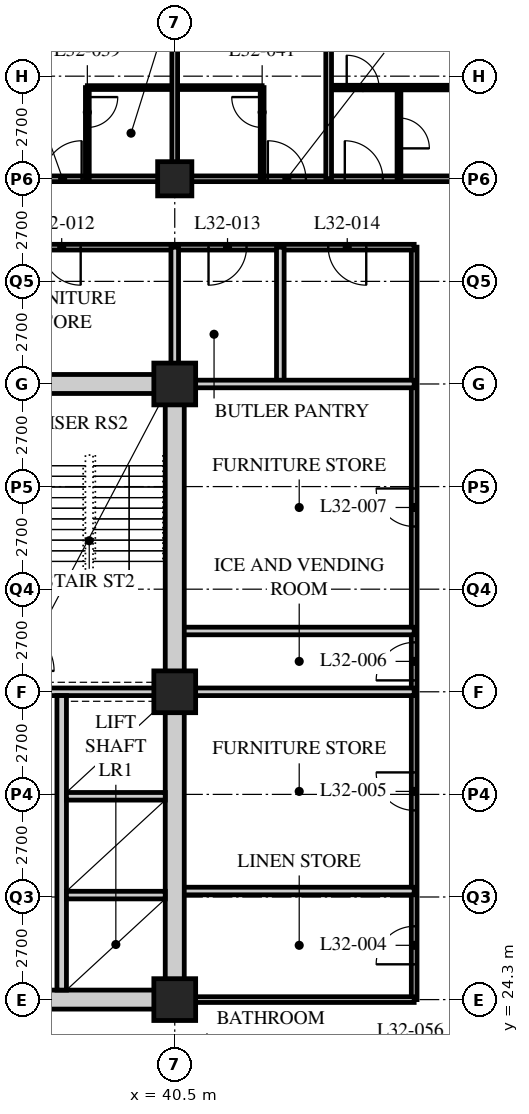
"""IFC4 building model, lengths in metres.
Left out: names, types, materials, properties, quantities, classifications, styles, units other than length and angle.
Written with IfcOpenShell. Run it as: python <this file> out.ifc"""

import sys

from ifc_helpers import new_model, si_unit, direction, frame, frame_2d, origin, origin_2d, place, context, subcontext, project, spatial, rectangle, hollow_rectangle, extrude, element, fill, save


model = new_model("IFC4")
c1 = context("Model", 3, precision=1e-05, world=origin(), true_north=direction((0.0, 1.0)))
c2 = subcontext(c1, "Body", "Model", "MODEL_VIEW")
j1 = project(units=[si_unit("LENGTHUNIT", "METRE"), si_unit("PLANEANGLEUNIT", "RADIAN")], contexts=[c1])
p1 = place(None, origin())
s1 = spatial("IfcSite", under=j1, at=p1, CompositionType="ELEMENT")
p2 = place(p1, origin())
s2 = spatial("IfcBuilding", under=s1, at=p2, CompositionType="ELEMENT")
p3 = place(p2, frame((0.0, 0.0, 127.2)))
s3 = spatial("IfcBuildingStorey", under=s2, at=p3, CompositionType="ELEMENT", Elevation=127.2)
for number, where, z_axis, x_axis in (
    (1, (40.5, 24.3, 0.0), (0.0, 0.0, 1.0), (1.0, 0.0, 0.0)),
    (2, (40.5, 32.4, 0.0), (0.0, 0.0, 1.0), (1.0, 0.0, 0.0)),
    (3, (40.5, 40.5, 0.0), (0.0, 0.0, 1.0), (1.0, 0.0, 0.0)),
):
    element("IfcColumn", number, at=place(p3, frame(where, z_axis=z_axis, x_axis=x_axis)), inside=s3, PredefinedType="COLUMN", context=c2, shape_type="SweptSolid", body=[
        extrude(hollow_rectangle(XDim=1.1, YDim=1.1, WallThickness=0.1, at=origin_2d()), origin(), (0.0, 0.0, 1.0), 3.4),
    ])
p4 = place(p3, frame((40.5, 45.9, 0.0), z_axis=(0.0, 0.0, 1.0), x_axis=(1.0, 0.0, 0.0)))
e4 = element("IfcColumn", 4, at=p4, inside=s3, PredefinedType="COLUMN", context=c2, shape_type="SweptSolid", body=[
    extrude(hollow_rectangle(XDim=0.9, YDim=0.9, WallThickness=0.09, at=origin_2d()), origin(), (0.0, 0.0, 1.0), 3.4),
])
p5 = place(p3, frame((8.1, 45.9, 0.0), z_axis=(0.0, 0.0, 1.0), x_axis=(1.0, 0.0, 0.0)))
e5 = element("IfcWall", 5, at=p5, inside=s3, PredefinedType="PARTITIONING", context=c2, shape_type="SweptSolid", body=[
    extrude(rectangle(XDim=40.5, YDim=0.15, at=frame_2d((20.25, 0.0))), origin(), (0.0, 0.0, 1.0), 2.578),
])
p6 = place(p5, frame((9.625, 0.0, 0.0)))
e6 = element("IfcOpeningElement", 6, at=p6, cuts=e5, PredefinedType="OPENING", context=c2, shape_type="SweptSolid", body=[
    extrude(rectangle(XDim=1.0, YDim=2.1, at=frame_2d((0.5, 1.05))), frame((0.0, 0.085, 0.0), z_axis=(0.0, -1.0, 0.0), x_axis=(1.0, 0.0, 0.0)), (0.0, 0.0, 1.0), 0.17),
])
p7 = place(p5, frame((21.65, 0.0, 0.0)))
e7 = element("IfcOpeningElement", 7, at=p7, cuts=e5, PredefinedType="OPENING", context=c2, shape_type="SweptSolid", body=[
    extrude(rectangle(XDim=1.0, YDim=2.1, at=frame_2d((0.5, 1.05))), frame((0.0, 0.085, 0.0), z_axis=(0.0, -1.0, 0.0), x_axis=(1.0, 0.0, 0.0)), (0.0, 0.0, 1.0), 0.17),
])
p8 = place(p5, frame((26.75, 0.0, 0.0)))
e8 = element("IfcOpeningElement", 8, at=p8, cuts=e5, PredefinedType="OPENING", context=c2, shape_type="SweptSolid", body=[
    extrude(rectangle(XDim=1.0, YDim=2.1, at=frame_2d((0.5, 1.05))), frame((0.0, 0.085, 0.0), z_axis=(0.0, -1.0, 0.0), x_axis=(1.0, 0.0, 0.0)), (0.0, 0.0, 1.0), 0.17),
])
p9 = place(p5, frame((28.95, 0.0, 0.0)))
e9 = element("IfcOpeningElement", 9, at=p9, cuts=e5, PredefinedType="OPENING", context=c2, shape_type="SweptSolid", body=[
    extrude(rectangle(XDim=1.0, YDim=2.1, at=frame_2d((0.5, 1.05))), frame((0.0, 0.085, 0.0), z_axis=(0.0, -1.0, 0.0), x_axis=(1.0, 0.0, 0.0)), (0.0, 0.0, 1.0), 0.17),
])
p10 = place(p5, frame((34.85, 0.0, 0.0)))
e10 = element("IfcOpeningElement", 10, at=p10, cuts=e5, PredefinedType="OPENING", context=c2, shape_type="SweptSolid", body=[
    extrude(rectangle(XDim=1.0, YDim=2.1, at=frame_2d((0.5, 1.05))), frame((0.0, 0.085, 0.0), z_axis=(0.0, -1.0, 0.0), x_axis=(1.0, 0.0, 0.0)), (0.0, 0.0, 1.0), 0.17),
])
p11 = place(p5, frame((36.875, 0.0, 0.0)))
e11 = element("IfcOpeningElement", 11, at=p11, cuts=e5, PredefinedType="OPENING", context=c2, shape_type="SweptSolid", body=[
    extrude(rectangle(XDim=1.0, YDim=2.1, at=frame_2d((0.5, 1.05))), frame((0.0, 0.085, 0.0), z_axis=(0.0, -1.0, 0.0), x_axis=(1.0, 0.0, 0.0)), (0.0, 0.0, 1.0), 0.17),
])
p12 = place(p5, frame((2.625, 0.0, 0.0)))
e12 = element("IfcOpeningElement", 12, at=p12, cuts=e5, PredefinedType="OPENING", context=c2, shape_type="SweptSolid", body=[
    extrude(rectangle(XDim=1.0, YDim=2.1, at=frame_2d((0.5, 1.05))), frame((0.0, 0.085, 0.0), z_axis=(0.0, -1.0, 0.0), x_axis=(1.0, 0.0, 0.0)), (0.0, 0.0, 1.0), 0.17),
])
p13 = place(p3, frame((46.8, 24.3, 0.0), z_axis=(0.0, 0.0, 1.0), x_axis=(0.0, 1.0, 0.0)))
e13 = element("IfcWall", 13, at=p13, inside=s3, PredefinedType="PARTITIONING", context=c2, shape_type="SweptSolid", body=[
    extrude(rectangle(XDim=19.8, YDim=0.15, at=frame_2d((9.9, 0.0))), origin(), (0.0, 0.0, 1.0), 3.19),
])
p14 = place(p13, frame((0.929, 0.0, 0.0)))
e14 = element("IfcOpeningElement", 14, at=p14, cuts=e13, PredefinedType="OPENING", context=c2, shape_type="SweptSolid", body=[
    extrude(rectangle(XDim=1.0, YDim=2.1, at=frame_2d((0.5, 1.05))), frame((0.0, 0.085, 0.0), z_axis=(0.0, -1.0, 0.0), x_axis=(1.0, 0.0, 0.0)), (0.0, 0.0, 1.0), 0.17),
])
p15 = place(p13, frame((4.979, 0.0, 0.0)))
e15 = element("IfcOpeningElement", 15, at=p15, cuts=e13, PredefinedType="OPENING", context=c2, shape_type="SweptSolid", body=[
    extrude(rectangle(XDim=1.0, YDim=2.1, at=frame_2d((0.5, 1.05))), frame((0.0, 0.085, 0.0), z_axis=(0.0, -1.0, 0.0), x_axis=(1.0, 0.0, 0.0)), (0.0, 0.0, 1.0), 0.17),
])
p16 = place(p13, frame((8.4, 0.0, 0.0)))
e16 = element("IfcOpeningElement", 16, at=p16, cuts=e13, PredefinedType="OPENING", context=c2, shape_type="SweptSolid", body=[
    extrude(rectangle(XDim=1.0, YDim=2.1, at=frame_2d((0.5, 1.05))), frame((0.0, 0.085, 0.0), z_axis=(0.0, -1.0, 0.0), x_axis=(1.0, 0.0, 0.0)), (0.0, 0.0, 1.0), 0.17),
])
p17 = place(p13, frame((12.45, 0.0, 0.0)))
e17 = element("IfcOpeningElement", 17, at=p17, cuts=e13, PredefinedType="OPENING", context=c2, shape_type="SweptSolid", body=[
    extrude(rectangle(XDim=1.0, YDim=2.1, at=frame_2d((0.5, 1.05))), frame((0.0, 0.085, 0.0), z_axis=(0.0, -1.0, 0.0), x_axis=(1.0, 0.0, 0.0)), (0.0, 0.0, 1.0), 0.17),
])
p18 = place(p3, frame((46.8, 44.1, 0.0), z_axis=(0.0, 0.0, 1.0), x_axis=(-1.0, 0.0, 0.0)))
e18 = element("IfcWall", 18, at=p18, inside=s3, PredefinedType="PARTITIONING", context=c2, shape_type="SweptSolid", body=[
    extrude(rectangle(XDim=17.24, YDim=0.15, at=frame_2d((8.62, 0.0))), origin(), (0.0, 0.0, 1.0), 3.19),
])
p19 = place(p18, frame((14.25, 0.0, 0.0)))
e19 = element("IfcOpeningElement", 19, at=p19, cuts=e18, PredefinedType="OPENING", context=c2, shape_type="SweptSolid", body=[
    extrude(rectangle(XDim=1.0, YDim=2.1, at=frame_2d((0.5, 1.05))), frame((0.0, 0.085, 0.0), z_axis=(0.0, -1.0, 0.0), x_axis=(1.0, 0.0, 0.0)), (0.0, 0.0, 1.0), 0.17),
])
p20 = place(p18, frame((8.775, 0.0, 0.0)))
e20 = element("IfcOpeningElement", 20, at=p20, cuts=e18, PredefinedType="OPENING", context=c2, shape_type="SweptSolid", body=[
    extrude(rectangle(XDim=1.0, YDim=2.1, at=frame_2d((0.5, 1.05))), frame((0.0, 0.085, 0.0), z_axis=(0.0, -1.0, 0.0), x_axis=(1.0, 0.0, 0.0)), (0.0, 0.0, 1.0), 0.17),
])
p21 = place(p18, frame((4.411, 0.0, 0.0)))
e21 = element("IfcOpeningElement", 21, at=p21, cuts=e18, PredefinedType="OPENING", context=c2, shape_type="SweptSolid", body=[
    extrude(rectangle(XDim=1.0, YDim=2.1, at=frame_2d((0.5, 1.05))), frame((0.0, 0.085, 0.0), z_axis=(0.0, -1.0, 0.0), x_axis=(1.0, 0.0, 0.0)), (0.0, 0.0, 1.0), 0.17),
])
p22 = place(p18, frame((1.261, 0.0, 0.0)))
e22 = element("IfcOpeningElement", 22, at=p22, cuts=e18, PredefinedType="OPENING", context=c2, shape_type="SweptSolid", body=[
    extrude(rectangle(XDim=1.0, YDim=2.1, at=frame_2d((0.5, 1.05))), frame((0.0, 0.085, 0.0), z_axis=(0.0, -1.0, 0.0), x_axis=(1.0, 0.0, 0.0)), (0.0, 0.0, 1.0), 0.17),
])
p23 = place(p3, frame((40.7, 24.3, 0.0), z_axis=(0.0, 0.0, 1.0), x_axis=(1.0, 0.0, 0.0)))
e23 = element("IfcWall", 23, at=p23, inside=s3, PredefinedType="PARTITIONING", context=c2, shape_type="SweptSolid", body=[
    extrude(rectangle(XDim=6.1, YDim=0.15, at=frame_2d((3.05, 0.0))), origin(), (0.0, 0.0, 1.0), 3.19),
])
for number, where, z_axis, x_axis in (
    (24, (40.5, 32.4, 0.0), (0.0, 0.0, 1.0), (1.0, 0.0, 0.0)),
    (25, (46.8, 27.157, 0.0), (0.0, 0.0, 1.0), (-1.0, 0.0, 0.0)),
    (26, (46.8, 34.0, 0.0), (0.0, 0.0, 1.0), (-1.0, 0.0, 0.0)),
):
    element("IfcWall", number, at=place(p3, frame(where, z_axis=z_axis, x_axis=x_axis)), inside=s3, PredefinedType="SOLIDWALL", context=c2, shape_type="SweptSolid", body=[
        extrude(rectangle(XDim=6.3, YDim=0.2, at=frame_2d((3.15, 0.0))), origin(), (0.0, 0.0, 1.0), 3.19),
    ])
p24 = place(p3, frame((40.5, 40.5, 0.0), z_axis=(0.0, 0.0, 1.0), x_axis=(0.0, 1.0, 0.0)))
e27 = element("IfcWall", 27, at=p24, inside=s3, PredefinedType="SOLIDWALL", context=c2, shape_type="SweptSolid", body=[
    extrude(rectangle(XDim=3.6, YDim=0.2, at=frame_2d((1.8, 0.0))), origin(), (0.0, 0.0, 1.0), 2.578),
])
p25 = place(p3, frame((43.278, 44.1, 0.0), z_axis=(0.0, 0.0, 1.0), x_axis=(0.0, -1.0, 0.0)))
e28 = element("IfcWall", 28, at=p25, inside=s3, PredefinedType="SOLIDWALL", context=c2, shape_type="SweptSolid", body=[
    extrude(rectangle(XDim=3.6, YDim=0.2, at=frame_2d((1.8, 0.0))), origin(), (0.0, 0.0, 1.0), 3.19),
])
p26 = place(p3, frame((40.5, 40.5, 0.0), z_axis=(0.0, 0.0, 1.0), x_axis=(1.0, 0.0, 0.0)))
e29 = element("IfcWall", 29, at=p26, inside=s3, PredefinedType="SOLIDWALL", context=c2, shape_type="SweptSolid", body=[
    extrude(rectangle(XDim=6.3, YDim=0.2, at=frame_2d((3.15, 0.0))), origin(), (0.0, 0.0, 1.0), 3.19),
])
p27 = place(p3, frame((38.2, 48.3, 0.0), z_axis=(0.0, 0.0, 1.0), x_axis=(1.0, 0.0, 0.0)))
e30 = element("IfcWall", 30, at=p27, inside=s3, PredefinedType="PARTITIONING", context=c2, shape_type="SweptSolid", body=[
    extrude(rectangle(XDim=4.6, YDim=0.1, at=frame_2d((2.3, 0.0))), origin(), (0.0, 0.0, 1.0), 3.19),
])
p28 = place(p3, frame((38.2, 45.9, 0.0), z_axis=(0.0, 0.0, 1.0), x_axis=(0.0, 1.0, 0.0)))
e31 = element("IfcWall", 31, at=p28, inside=s3, PredefinedType="PARTITIONING", context=c2, shape_type="SweptSolid", body=[
    extrude(rectangle(XDim=2.4, YDim=0.1, at=frame_2d((1.2, 0.0))), origin(), (0.0, 0.0, 1.0), 3.19),
])
p29 = place(p28, frame((1.35, 0.0, 0.0)))
e32 = element("IfcOpeningElement", 32, at=p29, cuts=e31, PredefinedType="OPENING", context=c2, shape_type="SweptSolid", body=[
    extrude(rectangle(XDim=0.8, YDim=2.1, at=frame_2d((0.4, 1.05))), frame((0.0, 0.06, 0.0), z_axis=(0.0, -1.0, 0.0), x_axis=(1.0, 0.0, 0.0)), (0.0, 0.0, 1.0), 0.12),
])
p30 = place(p3, frame((40.5, 45.9, 0.0), z_axis=(0.0, 0.0, 1.0), x_axis=(0.0, 1.0, 0.0)))
e33 = element("IfcWall", 33, at=p30, inside=s3, PredefinedType="PARTITIONING", context=c2, shape_type="SweptSolid", body=[
    extrude(rectangle(XDim=7.8, YDim=0.15, at=frame_2d((3.9, 0.0))), origin(), (0.0, 0.0, 1.0), 2.578),
])
p31 = place(p3, frame((42.8, 45.9, 0.0), z_axis=(0.0, 0.0, 1.0), x_axis=(0.0, 1.0, 0.0)))
e34 = element("IfcWall", 34, at=p31, inside=s3, PredefinedType="PARTITIONING", context=c2, shape_type="SweptSolid", body=[
    extrude(rectangle(XDim=2.4, YDim=0.1, at=frame_2d((1.2, 0.0))), origin(), (0.0, 0.0, 1.0), 3.19),
])
p32 = place(p31, frame((1.35, 0.0, 0.0)))
e35 = element("IfcOpeningElement", 35, at=p32, cuts=e34, PredefinedType="OPENING", context=c2, shape_type="SweptSolid", body=[
    extrude(rectangle(XDim=0.8, YDim=2.1, at=frame_2d((0.4, 1.05))), frame((0.0, 0.06, 0.0), z_axis=(0.0, -1.0, 0.0), x_axis=(1.0, 0.0, 0.0)), (0.0, 0.0, 1.0), 0.12),
])
p33 = place(p3, frame((44.55, 48.3, 0.0), z_axis=(0.0, 0.0, 1.0), x_axis=(1.0, 0.0, 0.0)))
e36 = element("IfcWall", 36, at=p33, inside=s3, PredefinedType="PARTITIONING", context=c2, shape_type="SweptSolid", body=[
    extrude(rectangle(XDim=4.05, YDim=0.12, at=frame_2d((2.025, 0.0))), origin(), (0.0, 0.0, 1.0), 3.19),
])
p34 = place(p33, frame((0.475, 0.0, 0.0)))
e37 = element("IfcOpeningElement", 37, at=p34, cuts=e36, PredefinedType="OPENING", context=c2, shape_type="SweptSolid", body=[
    extrude(rectangle(XDim=0.85, YDim=2.1, at=frame_2d((0.425, 1.05))), frame((0.0, 0.07, 0.0), z_axis=(0.0, -1.0, 0.0), x_axis=(1.0, 0.0, 0.0)), (0.0, 0.0, 1.0), 0.14),
])
p35 = place(p3, frame((46.4, 45.9, 0.0), z_axis=(0.0, 0.0, 1.0), x_axis=(0.0, 1.0, 0.0)))
e38 = element("IfcWall", 38, at=p35, inside=s3, PredefinedType="PARTITIONING", context=c2, shape_type="SweptSolid", body=[
    extrude(rectangle(XDim=2.4, YDim=0.1, at=frame_2d((1.2, 0.0))), origin(), (0.0, 0.0, 1.0), 3.19),
])
p36 = place(p35, frame((0.8, 0.0, 0.0)))
e39 = element("IfcOpeningElement", 39, at=p36, cuts=e38, PredefinedType="OPENING", context=c2, shape_type="SweptSolid", body=[
    extrude(rectangle(XDim=0.8, YDim=2.1, at=frame_2d((0.4, 1.05))), frame((0.0, 0.06, 0.0), z_axis=(0.0, -1.0, 0.0), x_axis=(1.0, 0.0, 0.0)), (0.0, 0.0, 1.0), 0.12),
])
p37 = place(p3, frame((44.55, 45.9, 0.0), z_axis=(0.0, 0.0, 1.0), x_axis=(0.0, 1.0, 0.0)))
e40 = element("IfcWall", 40, at=p37, inside=s3, PredefinedType="PARTITIONING", context=c2, shape_type="SweptSolid", body=[
    extrude(rectangle(XDim=7.8, YDim=0.15, at=frame_2d((3.9, 0.0))), origin(), (0.0, 0.0, 1.0), 3.19),
])
p38 = place(p3, frame((15.95, 24.3, 0.0), z_axis=(0.0, 0.0, 1.0), x_axis=(1.0, 0.0, 0.0)))
e41 = element("IfcWall", 41, at=p38, inside=s3, PredefinedType="SOLIDWALL", context=c2, shape_type="SweptSolid", body=[
    extrude(rectangle(XDim=24.8, YDim=0.5, at=frame_2d((12.4, 0.0))), origin(), (0.0, 0.0, 1.0), 2.54),
])
p39 = place(p38, frame((11.5, 0.0, 0.0)))
e42 = element("IfcOpeningElement", 42, at=p39, cuts=e41, PredefinedType="OPENING", context=c2, shape_type="SweptSolid", body=[
    extrude(rectangle(XDim=1.8, YDim=2.4, at=frame_2d((0.9, 1.2))), frame((0.0, 0.26, 0.0), z_axis=(0.0, -1.0, 0.0), x_axis=(1.0, 0.0, 0.0)), (0.0, 0.0, 1.0), 0.52),
])
p40 = place(p3, frame((15.95, 40.5, 0.0), z_axis=(0.0, 0.0, 1.0), x_axis=(1.0, 0.0, 0.0)))
e43 = element("IfcWall", 43, at=p40, inside=s3, PredefinedType="SOLIDWALL", context=c2, shape_type="SweptSolid", body=[
    extrude(rectangle(XDim=24.8, YDim=0.5, at=frame_2d((12.4, 0.0))), origin(), (0.0, 0.0, 1.0), 2.54),
])
p41 = place(p40, frame((11.5, 0.0, 0.0)))
e44 = element("IfcOpeningElement", 44, at=p41, cuts=e43, PredefinedType="OPENING", context=c2, shape_type="SweptSolid", body=[
    extrude(rectangle(XDim=1.8, YDim=2.4, at=frame_2d((0.9, 1.2))), frame((0.0, 0.26, 0.0), z_axis=(0.0, -1.0, 0.0), x_axis=(1.0, 0.0, 0.0)), (0.0, 0.0, 1.0), 0.52),
])
p42 = place(p3, frame((40.5, 24.55, 0.0), z_axis=(0.0, 0.0, 1.0), x_axis=(0.0, 1.0, 0.0)))
e45 = element("IfcWall", 45, at=p42, inside=s3, PredefinedType="SOLIDWALL", context=c2, shape_type="SweptSolid", body=[
    extrude(rectangle(XDim=15.7, YDim=0.5, at=frame_2d((7.85, 0.0))), origin(), (0.0, 0.0, 1.0), 2.578),
])
p43 = place(p3, frame((32.3, 32.4, 0.0), z_axis=(0.0, 0.0, 1.0), x_axis=(1.0, 0.0, 0.0)))
e46 = element("IfcWall", 46, at=p43, inside=s3, PredefinedType="SOLIDWALL", context=c2, shape_type="SweptSolid", body=[
    extrude(rectangle(XDim=7.95, YDim=0.2, at=frame_2d((3.975, 0.0))), origin(), (0.0, 0.0, 1.0), 2.578),
])
p44 = place(p3, frame((37.525, 24.55, 0.0), z_axis=(0.0, 0.0, 1.0), x_axis=(0.0, 1.0, 0.0)))
e47 = element("IfcWall", 47, at=p44, inside=s3, PredefinedType="SOLIDWALL", context=c2, shape_type="SweptSolid", body=[
    extrude(rectangle(XDim=7.75, YDim=0.25, at=frame_2d((3.875, 0.0))), origin(), (0.0, 0.0, 1.0), 3.19),
])
for number, where, z_axis, x_axis in (
    (48, (37.65, 27.05, 0.0), (0.0, 0.0, 1.0), (1.0, 0.0, 0.0)),
    (49, (37.65, 29.65, 0.0), (0.0, 0.0, 1.0), (1.0, 0.0, 0.0)),
):
    element("IfcWall", number, at=place(p3, frame(where, z_axis=z_axis, x_axis=x_axis)), inside=s3, PredefinedType="SOLIDWALL", context=c2, shape_type="SweptSolid", body=[
        extrude(rectangle(XDim=2.6, YDim=0.2, at=frame_2d((1.3, 0.0))), origin(), (0.0, 0.0, 1.0), 3.19),
    ])
p45 = place(p14, origin())
e50 = element("IfcDoor", 50, at=p45, inside=s3, OperationType="SINGLE_SWING_LEFT", PredefinedType="DOOR", context=c2, shape_type="SweptSolid", body=[
    extrude(rectangle(XDim=1.0, YDim=2.1, at=frame_2d((0.5, 1.05))), frame((0.0, 0.025, 0.0), z_axis=(0.0, -1.0, 0.0), x_axis=(1.0, 0.0, 0.0)), (0.0, 0.0, 1.0), 0.05),
])
fill(e14, e50)
p46 = place(p15, origin())
e51 = element("IfcDoor", 51, at=p46, inside=s3, OperationType="SINGLE_SWING_RIGHT", PredefinedType="DOOR", context=c2, shape_type="SweptSolid", body=[
    extrude(rectangle(XDim=1.0, YDim=2.1, at=frame_2d((0.5, 1.05))), frame((0.0, 0.025, 0.0), z_axis=(0.0, -1.0, 0.0), x_axis=(1.0, 0.0, 0.0)), (0.0, 0.0, 1.0), 0.05),
])
fill(e15, e51)
p47 = place(p16, origin())
e52 = element("IfcDoor", 52, at=p47, inside=s3, OperationType="SINGLE_SWING_LEFT", PredefinedType="DOOR", context=c2, shape_type="SweptSolid", body=[
    extrude(rectangle(XDim=1.0, YDim=2.1, at=frame_2d((0.5, 1.05))), frame((0.0, 0.025, 0.0), z_axis=(0.0, -1.0, 0.0), x_axis=(1.0, 0.0, 0.0)), (0.0, 0.0, 1.0), 0.05),
])
fill(e16, e52)
p48 = place(p17, origin())
e53 = element("IfcDoor", 53, at=p48, inside=s3, OperationType="SINGLE_SWING_RIGHT", PredefinedType="DOOR", context=c2, shape_type="SweptSolid", body=[
    extrude(rectangle(XDim=1.0, YDim=2.1, at=frame_2d((0.5, 1.05))), frame((0.0, 0.025, 0.0), z_axis=(0.0, -1.0, 0.0), x_axis=(1.0, 0.0, 0.0)), (0.0, 0.0, 1.0), 0.05),
])
fill(e17, e53)
p49 = place(p20, origin())
e54 = element("IfcDoor", 54, at=p49, inside=s3, OperationType="SINGLE_SWING_LEFT", PredefinedType="DOOR", context=c2, shape_type="SweptSolid", body=[
    extrude(rectangle(XDim=1.0, YDim=2.1, at=frame_2d((0.5, 1.05))), frame((0.0, 0.025, 0.0), z_axis=(0.0, -1.0, 0.0), x_axis=(1.0, 0.0, 0.0)), (0.0, 0.0, 1.0), 0.05),
])
fill(e20, e54)
p50 = place(p21, origin())
e55 = element("IfcDoor", 55, at=p50, inside=s3, OperationType="SINGLE_SWING_RIGHT", PredefinedType="DOOR", context=c2, shape_type="SweptSolid", body=[
    extrude(rectangle(XDim=1.0, YDim=2.1, at=frame_2d((0.5, 1.05))), frame((0.0, 0.025, 0.0), z_axis=(0.0, -1.0, 0.0), x_axis=(1.0, 0.0, 0.0)), (0.0, 0.0, 1.0), 0.05),
])
fill(e21, e55)
p51 = place(p22, origin())
e56 = element("IfcDoor", 56, at=p51, inside=s3, OperationType="SINGLE_SWING_LEFT", PredefinedType="DOOR", context=c2, shape_type="SweptSolid", body=[
    extrude(rectangle(XDim=1.0, YDim=2.1, at=frame_2d((0.5, 1.05))), frame((0.0, 0.025, 0.0), z_axis=(0.0, -1.0, 0.0), x_axis=(1.0, 0.0, 0.0)), (0.0, 0.0, 1.0), 0.05),
])
fill(e22, e56)
p52 = place(p29, origin())
e57 = element("IfcDoor", 57, at=p52, inside=s3, OperationType="SINGLE_SWING_LEFT", PredefinedType="DOOR", context=c2, shape_type="SweptSolid", body=[
    extrude(rectangle(XDim=0.8, YDim=2.1, at=frame_2d((0.4, 1.05))), frame((0.0, 0.025, 0.0), z_axis=(0.0, -1.0, 0.0), x_axis=(1.0, 0.0, 0.0)), (0.0, 0.0, 1.0), 0.05),
])
fill(e32, e57)
p53 = place(p9, origin())
e58 = element("IfcDoor", 58, at=p53, inside=s3, OperationType="SINGLE_SWING_RIGHT", PredefinedType="DOOR", context=c2, shape_type="SweptSolid", body=[
    extrude(rectangle(XDim=1.0, YDim=2.1, at=frame_2d((0.5, 1.05))), frame((0.0, 0.025, 0.0), z_axis=(0.0, -1.0, 0.0), x_axis=(1.0, 0.0, 0.0)), (0.0, 0.0, 1.0), 0.05),
])
fill(e9, e58)
p54 = place(p32, origin())
e59 = element("IfcDoor", 59, at=p54, inside=s3, OperationType="SINGLE_SWING_RIGHT", PredefinedType="DOOR", context=c2, shape_type="SweptSolid", body=[
    extrude(rectangle(XDim=0.8, YDim=2.1, at=frame_2d((0.4, 1.05))), frame((0.0, 0.025, 0.0), z_axis=(0.0, -1.0, 0.0), x_axis=(1.0, 0.0, 0.0)), (0.0, 0.0, 1.0), 0.05),
])
fill(e35, e59)
p55 = place(p10, origin())
e60 = element("IfcDoor", 60, at=p55, inside=s3, OperationType="SINGLE_SWING_LEFT", PredefinedType="DOOR", context=c2, shape_type="SweptSolid", body=[
    extrude(rectangle(XDim=1.0, YDim=2.1, at=frame_2d((0.5, 1.05))), frame((0.0, 0.025, 0.0), z_axis=(0.0, -1.0, 0.0), x_axis=(1.0, 0.0, 0.0)), (0.0, 0.0, 1.0), 0.05),
])
fill(e10, e60)
p56 = place(p36, origin())
e61 = element("IfcDoor", 61, at=p56, inside=s3, OperationType="SINGLE_SWING_RIGHT", PredefinedType="DOOR", context=c2, shape_type="SweptSolid", body=[
    extrude(rectangle(XDim=0.8, YDim=2.1, at=frame_2d((0.4, 1.05))), frame((0.0, 0.025, 0.0), z_axis=(0.0, -1.0, 0.0), x_axis=(1.0, 0.0, 0.0)), (0.0, 0.0, 1.0), 0.05),
])
fill(e39, e61)
p57 = place(p11, origin())
e62 = element("IfcDoor", 62, at=p57, inside=s3, OperationType="SINGLE_SWING_LEFT", PredefinedType="DOOR", context=c2, shape_type="SweptSolid", body=[
    extrude(rectangle(XDim=1.0, YDim=2.1, at=frame_2d((0.5, 1.05))), frame((0.0, 0.025, 0.0), z_axis=(0.0, -1.0, 0.0), x_axis=(1.0, 0.0, 0.0)), (0.0, 0.0, 1.0), 0.05),
])
fill(e11, e62)
p58 = place(p34, origin())
e63 = element("IfcDoor", 63, at=p58, inside=s3, OperationType="SINGLE_SWING_LEFT", PredefinedType="DOOR", context=c2, shape_type="SweptSolid", body=[
    extrude(rectangle(XDim=0.85, YDim=2.1, at=frame_2d((0.425, 1.05))), frame((0.0, 0.025, 0.0), z_axis=(0.0, -1.0, 0.0), x_axis=(1.0, 0.0, 0.0)), (0.0, 0.0, 1.0), 0.05),
])
fill(e37, e63)
save(model, sys.argv[1])
